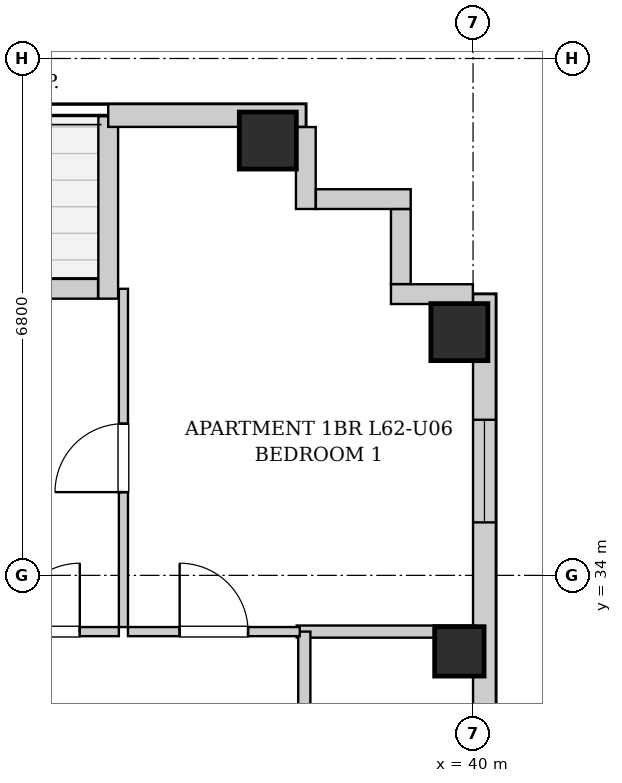
"""IFC4 building model, lengths in metres.
Left out: names, types, materials, properties, quantities, classifications, styles, units other than length and angle.
Written with IfcOpenShell. Run it as: python <this file> out.ifc"""

import sys

from ifc_helpers import new_model, si_unit, direction, frame, frame_2d, origin, origin_2d, place, context, subcontext, project, spatial, rectangle, extrude, element, fill, save


model = new_model("IFC4")
c1 = context("Model", 3, precision=1e-05, world=origin(), true_north=direction((0.0, 1.0)))
c2 = subcontext(c1, "Body", "Model", "MODEL_VIEW")
j1 = project(units=[si_unit("LENGTHUNIT", "METRE"), si_unit("PLANEANGLEUNIT", "RADIAN")], contexts=[c1])
p1 = place(None, origin())
s1 = spatial("IfcSite", under=j1, at=p1, CompositionType="ELEMENT")
p2 = place(p1, origin())
s2 = spatial("IfcBuilding", under=s1, at=p2, CompositionType="ELEMENT")
p3 = place(p2, frame((0.0, 0.0, 214.0)))
s3 = spatial("IfcBuildingStorey", under=s2, at=p3, CompositionType="ELEMENT", Elevation=214.0)
p4 = place(p3, frame((37.3, 39.72, 0.0), z_axis=(0.0, 0.0, 1.0), x_axis=(1.0, 0.0, 0.0)))
e1 = element("IfcColumn", 1, at=p4, inside=s3, PredefinedType="COLUMN", context=c2, shape_type="SweptSolid", body=[
    extrude(rectangle(XDim=0.75, YDim=0.75, at=origin_2d()), origin(), (0.0, 0.0, 1.0), 3.3),
])
p5 = place(p3, frame((39.82, 33.0, 0.0), z_axis=(0.0, 0.0, 1.0), x_axis=(1.0, 0.0, 0.0)))
e2 = element("IfcColumn", 2, at=p5, inside=s3, PredefinedType="COLUMN", context=c2, shape_type="SweptSolid", body=[
    extrude(rectangle(XDim=0.65, YDim=0.65, at=origin_2d()), origin(), (0.0, 0.0, 1.0), 3.3),
])
p6 = place(p3, frame((39.82, 37.2, 0.0), z_axis=(0.0, 0.0, 1.0), x_axis=(1.0, 0.0, 0.0)))
e3 = element("IfcColumn", 3, at=p6, inside=s3, PredefinedType="COLUMN", context=c2, shape_type="SweptSolid", body=[
    extrude(rectangle(XDim=0.75, YDim=0.75, at=origin_2d()), origin(), (0.0, 0.0, 1.0), 3.3),
])
p7 = place(p3, frame((30.184, 37.77, 0.0), z_axis=(0.0, 0.0, 1.0), x_axis=(1.0, 0.0, 0.0)))
e4 = element("IfcWall", 4, at=p7, inside=s3, PredefinedType="SOLIDWALL", context=c2, shape_type="SweptSolid", body=[
    extrude(rectangle(XDim=4.882, YDim=0.26, at=frame_2d((2.441, 0.0))), origin(), (0.0, 0.0, 1.0), 3.04),
])
p8 = place(p7, frame((1.891, 0.0, 0.0)))
e5 = element("IfcOpeningElement", 5, at=p8, cuts=e4, PredefinedType="OPENING", context=c2, shape_type="SweptSolid", body=[
    extrude(rectangle(XDim=1.1, YDim=2.0, at=frame_2d((0.55, 1.0))), frame((0.0, 0.14, 0.0), z_axis=(0.0, -1.0, 0.0), x_axis=(1.0, 0.0, 0.0)), (0.0, 0.0, 1.0), 0.28),
])
p9 = place(p7, frame((3.151, 0.0, 0.55)))
e6 = element("IfcOpeningElement", 6, at=p9, cuts=e4, PredefinedType="OPENING", context=c2, shape_type="SweptSolid", body=[
    extrude(rectangle(XDim=0.85, YDim=1.2, at=frame_2d((0.425, 0.6))), frame((0.0, 0.14, 0.0), z_axis=(0.0, -1.0, 0.0), x_axis=(1.0, 0.0, 0.0)), (0.0, 0.0, 1.0), 0.28),
])
p10 = place(p3, frame((35.2, 37.64, 0.0), z_axis=(0.0, 0.0, 1.0), x_axis=(0.0, 1.0, 0.0)))
e7 = element("IfcWall", 7, at=p10, inside=s3, PredefinedType="SOLIDWALL", context=c2, shape_type="SweptSolid", body=[
    extrude(rectangle(XDim=2.4, YDim=0.26, at=frame_2d((1.2, 0.0))), origin(), (0.0, 0.0, 1.0), 3.04),
])
p11 = place(p3, frame((35.2, 40.05, 0.0), z_axis=(0.0, 0.0, 1.0), x_axis=(1.0, 0.0, 0.0)))
e8 = element("IfcWall", 8, at=p11, inside=s3, PredefinedType="SOLIDWALL", context=c2, shape_type="SweptSolid", body=[
    extrude(rectangle(XDim=2.6, YDim=0.3, at=frame_2d((1.3, 0.0))), origin(), (0.0, 0.0, 1.0), 3.04),
])
p12 = place(p3, frame((40.15, 37.7, 0.0), z_axis=(0.0, 0.0, 1.0), x_axis=(0.0, -1.0, 0.0)))
e9 = element("IfcWall", 9, at=p12, inside=s3, PredefinedType="SOLIDWALL", context=c2, shape_type="SweptSolid", body=[
    extrude(rectangle(XDim=31.4, YDim=0.3, at=frame_2d((15.7, 0.0))), origin(), (0.0, 0.0, 1.0), 3.04),
])
p13 = place(p12, frame((28.396, 0.0, 0.55)))
e10 = element("IfcOpeningElement", 10, at=p13, cuts=e9, PredefinedType="OPENING", context=c2, shape_type="SweptSolid", body=[
    extrude(rectangle(XDim=1.35, YDim=1.2, at=frame_2d((0.675, 0.6))), frame((0.0, 0.16, 0.0), z_axis=(0.0, -1.0, 0.0), x_axis=(1.0, 0.0, 0.0)), (0.0, 0.0, 1.0), 0.32),
])
p14 = place(p12, frame((1.653, 0.0, 0.55)))
e11 = element("IfcOpeningElement", 11, at=p14, cuts=e9, PredefinedType="OPENING", context=c2, shape_type="SweptSolid", body=[
    extrude(rectangle(XDim=1.35, YDim=1.2, at=frame_2d((0.675, 0.6))), frame((0.0, 0.16, 0.0), z_axis=(0.0, -1.0, 0.0), x_axis=(1.0, 0.0, 0.0)), (0.0, 0.0, 1.0), 0.32),
])
p15 = place(p12, frame((18.856, 0.0, 0.55)))
e12 = element("IfcOpeningElement", 12, at=p15, cuts=e9, PredefinedType="OPENING", context=c2, shape_type="SweptSolid", body=[
    extrude(rectangle(XDim=1.35, YDim=1.2, at=frame_2d((0.675, 0.6))), frame((0.0, 0.16, 0.0), z_axis=(0.0, -1.0, 0.0), x_axis=(1.0, 0.0, 0.0)), (0.0, 0.0, 1.0), 0.32),
])
p16 = place(p12, frame((20.466, 0.0, 0.55)))
e13 = element("IfcOpeningElement", 13, at=p16, cuts=e9, PredefinedType="OPENING", context=c2, shape_type="SweptSolid", body=[
    extrude(rectangle(XDim=1.35, YDim=1.2, at=frame_2d((0.675, 0.6))), frame((0.0, 0.16, 0.0), z_axis=(0.0, -1.0, 0.0), x_axis=(1.0, 0.0, 0.0)), (0.0, 0.0, 1.0), 0.32),
])
p17 = place(p12, frame((11.85, 0.0, 0.55)))
e14 = element("IfcOpeningElement", 14, at=p17, cuts=e9, PredefinedType="OPENING", context=c2, shape_type="SweptSolid", body=[
    extrude(rectangle(XDim=1.35, YDim=1.2, at=frame_2d((0.675, 0.6))), frame((0.0, 0.16, 0.0), z_axis=(0.0, -1.0, 0.0), x_axis=(1.0, 0.0, 0.0)), (0.0, 0.0, 1.0), 0.32),
])
p18 = place(p12, frame((9.185, 0.0, 0.55)))
e15 = element("IfcOpeningElement", 15, at=p18, cuts=e9, PredefinedType="OPENING", context=c2, shape_type="SweptSolid", body=[
    extrude(rectangle(XDim=1.35, YDim=1.2, at=frame_2d((0.675, 0.6))), frame((0.0, 0.16, 0.0), z_axis=(0.0, -1.0, 0.0), x_axis=(1.0, 0.0, 0.0)), (0.0, 0.0, 1.0), 0.32),
])
p19 = place(p3, frame((37.8, 39.898, 0.0), z_axis=(0.0, 0.0, 1.0), x_axis=(0.0, -1.0, 0.0)))
e16 = element("IfcWall", 16, at=p19, inside=s3, PredefinedType="SOLIDWALL", context=c2, shape_type="SweptSolid", body=[
    extrude(rectangle(XDim=1.078, YDim=0.26, at=frame_2d((0.539, 0.0))), origin(), (0.0, 0.0, 1.0), 3.04),
])
p20 = place(p3, frame((37.932, 38.95, 0.0), z_axis=(0.0, 0.0, 1.0), x_axis=(1.0, 0.0, 0.0)))
e17 = element("IfcWall", 17, at=p20, inside=s3, PredefinedType="SOLIDWALL", context=c2, shape_type="SweptSolid", body=[
    extrude(rectangle(XDim=1.248, YDim=0.26, at=frame_2d((0.624, 0.0))), origin(), (0.0, 0.0, 1.0), 3.04),
])
p21 = place(p3, frame((39.05, 38.818, 0.0), z_axis=(0.0, 0.0, 1.0), x_axis=(0.0, -1.0, 0.0)))
e18 = element("IfcWall", 18, at=p21, inside=s3, PredefinedType="SOLIDWALL", context=c2, shape_type="SweptSolid", body=[
    extrude(rectangle(XDim=0.986, YDim=0.26, at=frame_2d((0.493, 0.0))), origin(), (0.0, 0.0, 1.0), 3.04),
])
p22 = place(p3, frame((38.92, 37.7, 0.0), z_axis=(0.0, 0.0, 1.0), x_axis=(1.0, 0.0, 0.0)))
e19 = element("IfcWall", 19, at=p22, inside=s3, PredefinedType="SOLIDWALL", context=c2, shape_type="SweptSolid", body=[
    extrude(rectangle(XDim=1.078, YDim=0.26, at=frame_2d((0.539, 0.0))), origin(), (0.0, 0.0, 1.0), 3.04),
])
p23 = place(p3, frame((37.68, 33.26, 0.0), z_axis=(0.0, 0.0, 1.0), x_axis=(1.0, 0.0, 0.0)))
e20 = element("IfcWall", 20, at=p23, inside=s3, PredefinedType="PARTITIONING", context=c2, shape_type="SweptSolid", body=[
    extrude(rectangle(XDim=2.34, YDim=0.16, at=frame_2d((1.17, 0.0))), origin(), (0.0, 0.0, 1.0), 3.04),
])
p24 = place(p3, frame((37.78, 30.6, 0.0), z_axis=(0.0, 0.0, 1.0), x_axis=(0.0, 1.0, 0.0)))
e21 = element("IfcWall", 21, at=p24, inside=s3, PredefinedType="PARTITIONING", context=c2, shape_type="SweptSolid", body=[
    extrude(rectangle(XDim=2.66, YDim=0.16, at=frame_2d((1.33, 0.0))), origin(), (0.0, 0.0, 1.0), 3.04),
])
p25 = place(p3, frame((33.412, 33.26, 0.0), z_axis=(0.0, 0.0, 1.0), x_axis=(1.0, 0.0, 0.0)))
e22 = element("IfcWall", 22, at=p25, inside=s3, PredefinedType="PARTITIONING", context=c2, shape_type="SweptSolid", body=[
    extrude(rectangle(XDim=1.928, YDim=0.12, at=frame_2d((0.964, 0.0))), origin(), (0.0, 0.0, 1.0), 3.04),
])
p26 = place(p25, frame((0.514, 0.0, 0.0)))
e23 = element("IfcOpeningElement", 23, at=p26, cuts=e22, PredefinedType="OPENING", context=c2, shape_type="SweptSolid", body=[
    extrude(rectangle(XDim=0.9, YDim=2.05, at=frame_2d((0.45, 1.025))), frame((0.0, 0.07, 0.0), z_axis=(0.0, -1.0, 0.0), x_axis=(1.0, 0.0, 0.0)), (0.0, 0.0, 1.0), 0.14),
])
p27 = place(p3, frame((35.46, 33.26, 0.0), z_axis=(0.0, 0.0, 1.0), x_axis=(1.0, 0.0, 0.0)))
e24 = element("IfcWall", 24, at=p27, inside=s3, PredefinedType="PARTITIONING", context=c2, shape_type="SweptSolid", body=[
    extrude(rectangle(XDim=2.26, YDim=0.12, at=frame_2d((1.13, 0.0))), origin(), (0.0, 0.0, 1.0), 3.04),
])
p28 = place(p27, frame((0.68, 0.0, 0.0)))
e25 = element("IfcOpeningElement", 25, at=p28, cuts=e24, PredefinedType="OPENING", context=c2, shape_type="SweptSolid", body=[
    extrude(rectangle(XDim=0.9, YDim=2.05, at=frame_2d((0.45, 1.025))), frame((0.0, 0.07, 0.0), z_axis=(0.0, -1.0, 0.0), x_axis=(1.0, 0.0, 0.0)), (0.0, 0.0, 1.0), 0.14),
])
p29 = place(p3, frame((35.4, 33.32, 0.0), z_axis=(0.0, 0.0, 1.0), x_axis=(0.0, 1.0, 0.0)))
e26 = element("IfcWall", 26, at=p29, inside=s3, PredefinedType="PARTITIONING", context=c2, shape_type="SweptSolid", body=[
    extrude(rectangle(XDim=4.45, YDim=0.12, at=frame_2d((2.225, 0.0))), origin(), (0.0, 0.0, 1.0), 3.04),
])
p30 = place(p29, frame((1.775, 0.0, 0.0)))
e27 = element("IfcOpeningElement", 27, at=p30, cuts=e26, PredefinedType="OPENING", context=c2, shape_type="SweptSolid", body=[
    extrude(rectangle(XDim=0.9, YDim=2.05, at=frame_2d((0.45, 1.025))), frame((0.0, 0.07, 0.0), z_axis=(0.0, -1.0, 0.0), x_axis=(1.0, 0.0, 0.0)), (0.0, 0.0, 1.0), 0.14),
])
p31 = place(p26, origin())
e28 = element("IfcDoor", 28, at=p31, inside=s3, OperationType="SINGLE_SWING_RIGHT", PredefinedType="DOOR", context=c2, shape_type="SweptSolid", body=[
    extrude(rectangle(XDim=0.9, YDim=2.05, at=frame_2d((0.45, 1.025))), frame((0.0, 0.025, 0.0), z_axis=(0.0, -1.0, 0.0), x_axis=(1.0, 0.0, 0.0)), (0.0, 0.0, 1.0), 0.05),
])
fill(e23, e28)
p32 = place(p28, origin())
e29 = element("IfcDoor", 29, at=p32, inside=s3, OperationType="SINGLE_SWING_LEFT", PredefinedType="DOOR", context=c2, shape_type="SweptSolid", body=[
    extrude(rectangle(XDim=0.9, YDim=2.05, at=frame_2d((0.45, 1.025))), frame((0.0, 0.025, 0.0), z_axis=(0.0, -1.0, 0.0), x_axis=(1.0, 0.0, 0.0)), (0.0, 0.0, 1.0), 0.05),
])
fill(e25, e29)
p33 = place(p30, origin())
e30 = element("IfcDoor", 30, at=p33, inside=s3, OperationType="SINGLE_SWING_LEFT", PredefinedType="DOOR", context=c2, shape_type="SweptSolid", body=[
    extrude(rectangle(XDim=0.9, YDim=2.05, at=frame_2d((0.45, 1.025))), frame((0.0, 0.025, 0.0), z_axis=(0.0, -1.0, 0.0), x_axis=(1.0, 0.0, 0.0)), (0.0, 0.0, 1.0), 0.05),
])
fill(e27, e30)
p34 = place(p14, origin())
e31 = element("IfcWindow", 31, at=p34, inside=s3, PartitioningType="SINGLE_PANEL", PredefinedType="WINDOW", context=c2, shape_type="SweptSolid", body=[
    extrude(rectangle(XDim=1.35, YDim=1.2, at=frame_2d((0.675, 0.6))), frame((0.0, 0.03, 0.0), z_axis=(0.0, -1.0, 0.0), x_axis=(1.0, 0.0, 0.0)), (0.0, 0.0, 1.0), 0.06),
])
fill(e11, e31)
save(model, sys.argv[1])
